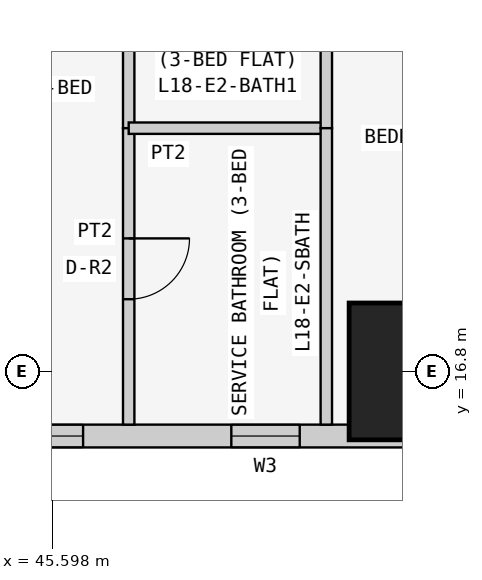
"""IFC4 building model, lengths in metres.
Left out: names, types, materials, properties, quantities, classifications, styles, units other than length and angle.
Written with IfcOpenShell. Run it as: python <this file> out.ifc"""

import sys

from ifc_helpers import new_model, si_unit, direction, frame, frame_2d, origin, origin_2d, place, context, subcontext, project, spatial, rectangle, extrude, element, fill, save


model = new_model("IFC4")
c1 = context("Model", 3, precision=1e-05, world=origin(), true_north=direction((0.0, 1.0)))
c2 = subcontext(c1, "Body", "Model", "MODEL_VIEW")
j1 = project(units=[si_unit("LENGTHUNIT", "METRE"), si_unit("PLANEANGLEUNIT", "RADIAN")], contexts=[c1])
p1 = place(None, origin())
s1 = spatial("IfcSite", under=j1, at=p1, CompositionType="ELEMENT")
p2 = place(p1, origin())
s2 = spatial("IfcBuilding", under=s1, at=p2, CompositionType="ELEMENT")
p3 = place(p2, frame((0.0, 0.0, 74.1)))
s3 = spatial("IfcBuildingStorey", under=s2, at=p3, CompositionType="ELEMENT", Elevation=74.1)
p4 = place(p3, frame((50.4, 16.8, 0.0), z_axis=(0.0, 0.0, 1.0), x_axis=(1.0, 0.0, 0.0)))
e1 = element("IfcColumn", 1, at=p4, inside=s3, PredefinedType="COLUMN", context=c2, shape_type="SweptSolid", body=[
    extrude(rectangle(XDim=1.8, YDim=1.8, at=origin_2d()), origin(), (0.0, 0.0, 1.0), 3.6),
])
p5 = place(p3, frame((43.0, 15.95, 0.0), z_axis=(0.0, 0.0, 1.0), x_axis=(1.0, 0.0, 0.0)))
e2 = element("IfcWall", 2, at=p5, inside=s3, PredefinedType="SOLIDWALL", context=c2, shape_type="SweptSolid", body=[
    extrude(rectangle(XDim=15.4, YDim=0.3, at=frame_2d((7.7, 0.0))), origin(), (0.0, 0.0, 1.0), 3.45),
])
p6 = place(p5, frame((1.2, 0.0, 0.9)))
e3 = element("IfcOpeningElement", 3, at=p6, cuts=e2, PredefinedType="OPENING", context=c2, shape_type="SweptSolid", body=[
    extrude(rectangle(XDim=1.8, YDim=1.5, at=frame_2d((0.9, 0.75))), frame((0.0, 0.16, 0.0), z_axis=(0.0, -1.0, 0.0), x_axis=(1.0, 0.0, 0.0)), (0.0, 0.0, 1.0), 0.32),
])
p7 = place(p5, frame((4.95, 0.0, 1.5)))
e4 = element("IfcOpeningElement", 4, at=p7, cuts=e2, PredefinedType="OPENING", context=c2, shape_type="SweptSolid", body=[
    extrude(rectangle(XDim=0.9, YDim=0.7, at=frame_2d((0.45, 0.35))), frame((0.0, 0.16, 0.0), z_axis=(0.0, -1.0, 0.0), x_axis=(1.0, 0.0, 0.0)), (0.0, 0.0, 1.0), 0.32),
])
p8 = place(p5, frame((8.5, 0.0, 0.9)))
e5 = element("IfcOpeningElement", 5, at=p8, cuts=e2, PredefinedType="OPENING", context=c2, shape_type="SweptSolid", body=[
    extrude(rectangle(XDim=1.8, YDim=1.5, at=frame_2d((0.9, 0.75))), frame((0.0, 0.16, 0.0), z_axis=(0.0, -1.0, 0.0), x_axis=(1.0, 0.0, 0.0)), (0.0, 0.0, 1.0), 0.32),
])
p9 = place(p5, frame((12.5, 0.0, 0.0)))
e6 = element("IfcOpeningElement", 6, at=p9, cuts=e2, PredefinedType="OPENING", context=c2, shape_type="SweptSolid", body=[
    extrude(rectangle(XDim=0.9, YDim=2.4, at=frame_2d((0.45, 1.2))), frame((0.0, 0.16, 0.0), z_axis=(0.0, -1.0, 0.0), x_axis=(1.0, 0.0, 0.0)), (0.0, 0.0, 1.0), 0.32),
])
p10 = place(p5, frame((13.5, 0.0, 0.9)))
e7 = element("IfcOpeningElement", 7, at=p10, cuts=e2, PredefinedType="OPENING", context=c2, shape_type="SweptSolid", body=[
    extrude(rectangle(XDim=1.2, YDim=1.5, at=frame_2d((0.6, 0.75))), frame((0.0, 0.16, 0.0), z_axis=(0.0, -1.0, 0.0), x_axis=(1.0, 0.0, 0.0)), (0.0, 0.0, 1.0), 0.32),
])
p11 = place(p3, frame((46.6, 22.971, 0.0), z_axis=(0.0, 0.0, 1.0), x_axis=(0.0, -1.0, 0.0)))
e8 = element("IfcWall", 8, at=p11, inside=s3, PredefinedType="PARTITIONING", context=c2, shape_type="SweptSolid", body=[
    extrude(rectangle(XDim=2.971, YDim=0.15, at=frame_2d((1.485, 0.0))), origin(), (0.0, 0.0, 1.0), 3.45),
])
p12 = place(p3, frame((46.6, 20.0, 0.0), z_axis=(0.0, 0.0, 1.0), x_axis=(0.0, -1.0, 0.0)))
e9 = element("IfcWall", 9, at=p12, inside=s3, PredefinedType="PARTITIONING", context=c2, shape_type="SweptSolid", body=[
    extrude(rectangle(XDim=3.9, YDim=0.15, at=frame_2d((1.95, 0.0))), origin(), (0.0, 0.0, 1.0), 3.45),
])
p13 = place(p12, frame((1.45, 0.0, 0.0)))
e10 = element("IfcOpeningElement", 10, at=p13, cuts=e9, PredefinedType="OPENING", context=c2, shape_type="SweptSolid", body=[
    extrude(rectangle(XDim=0.8, YDim=2.1, at=frame_2d((0.4, 1.05))), frame((0.0, 0.085, 0.0), z_axis=(0.0, -1.0, 0.0), x_axis=(1.0, 0.0, 0.0)), (0.0, 0.0, 1.0), 0.17),
])
p14 = place(p3, frame((49.2, 20.0, 0.0), z_axis=(0.0, 0.0, 1.0), x_axis=(-1.0, 0.0, 0.0)))
e11 = element("IfcWall", 11, at=p14, inside=s3, PredefinedType="PARTITIONING", context=c2, shape_type="SweptSolid", body=[
    extrude(rectangle(XDim=2.6, YDim=0.15, at=frame_2d((1.3, 0.0))), origin(), (0.0, 0.0, 1.0), 3.45),
])
p15 = place(p3, frame((49.2, 22.971, 0.0), z_axis=(0.0, 0.0, 1.0), x_axis=(0.0, -1.0, 0.0)))
e12 = element("IfcWall", 12, at=p15, inside=s3, PredefinedType="PARTITIONING", context=c2, shape_type="SweptSolid", body=[
    extrude(rectangle(XDim=2.971, YDim=0.15, at=frame_2d((1.485, 0.0))), origin(), (0.0, 0.0, 1.0), 3.45),
])
p16 = place(p3, frame((49.2, 20.0, 0.0), z_axis=(0.0, 0.0, 1.0), x_axis=(0.0, -1.0, 0.0)))
e13 = element("IfcWall", 13, at=p16, inside=s3, PredefinedType="PARTITIONING", context=c2, shape_type="SweptSolid", body=[
    extrude(rectangle(XDim=3.9, YDim=0.15, at=frame_2d((1.95, 0.0))), origin(), (0.0, 0.0, 1.0), 3.45),
])
p17 = place(p6, origin())
e14 = element("IfcWindow", 14, at=p17, inside=s3, PartitioningType="SINGLE_PANEL", PredefinedType="WINDOW", context=c2, shape_type="SweptSolid", body=[
    extrude(rectangle(XDim=1.8, YDim=1.5, at=frame_2d((0.9, 0.75))), frame((0.0, 0.03, 0.0), z_axis=(0.0, -1.0, 0.0), x_axis=(1.0, 0.0, 0.0)), (0.0, 0.0, 1.0), 0.06),
])
fill(e3, e14)
p18 = place(p7, origin())
e15 = element("IfcWindow", 15, at=p18, inside=s3, PartitioningType="SINGLE_PANEL", PredefinedType="WINDOW", context=c2, shape_type="SweptSolid", body=[
    extrude(rectangle(XDim=0.9, YDim=0.7, at=frame_2d((0.45, 0.35))), frame((0.0, 0.03, 0.0), z_axis=(0.0, -1.0, 0.0), x_axis=(1.0, 0.0, 0.0)), (0.0, 0.0, 1.0), 0.06),
])
fill(e4, e15)
p19 = place(p13, origin())
e16 = element("IfcDoor", 16, at=p19, inside=s3, OperationType="SINGLE_SWING_LEFT", PredefinedType="DOOR", context=c2, shape_type="SweptSolid", body=[
    extrude(rectangle(XDim=0.8, YDim=2.1, at=frame_2d((0.4, 1.05))), frame((0.0, 0.025, 0.0), z_axis=(0.0, -1.0, 0.0), x_axis=(1.0, 0.0, 0.0)), (0.0, 0.0, 1.0), 0.05),
])
fill(e10, e16)
save(model, sys.argv[1])
